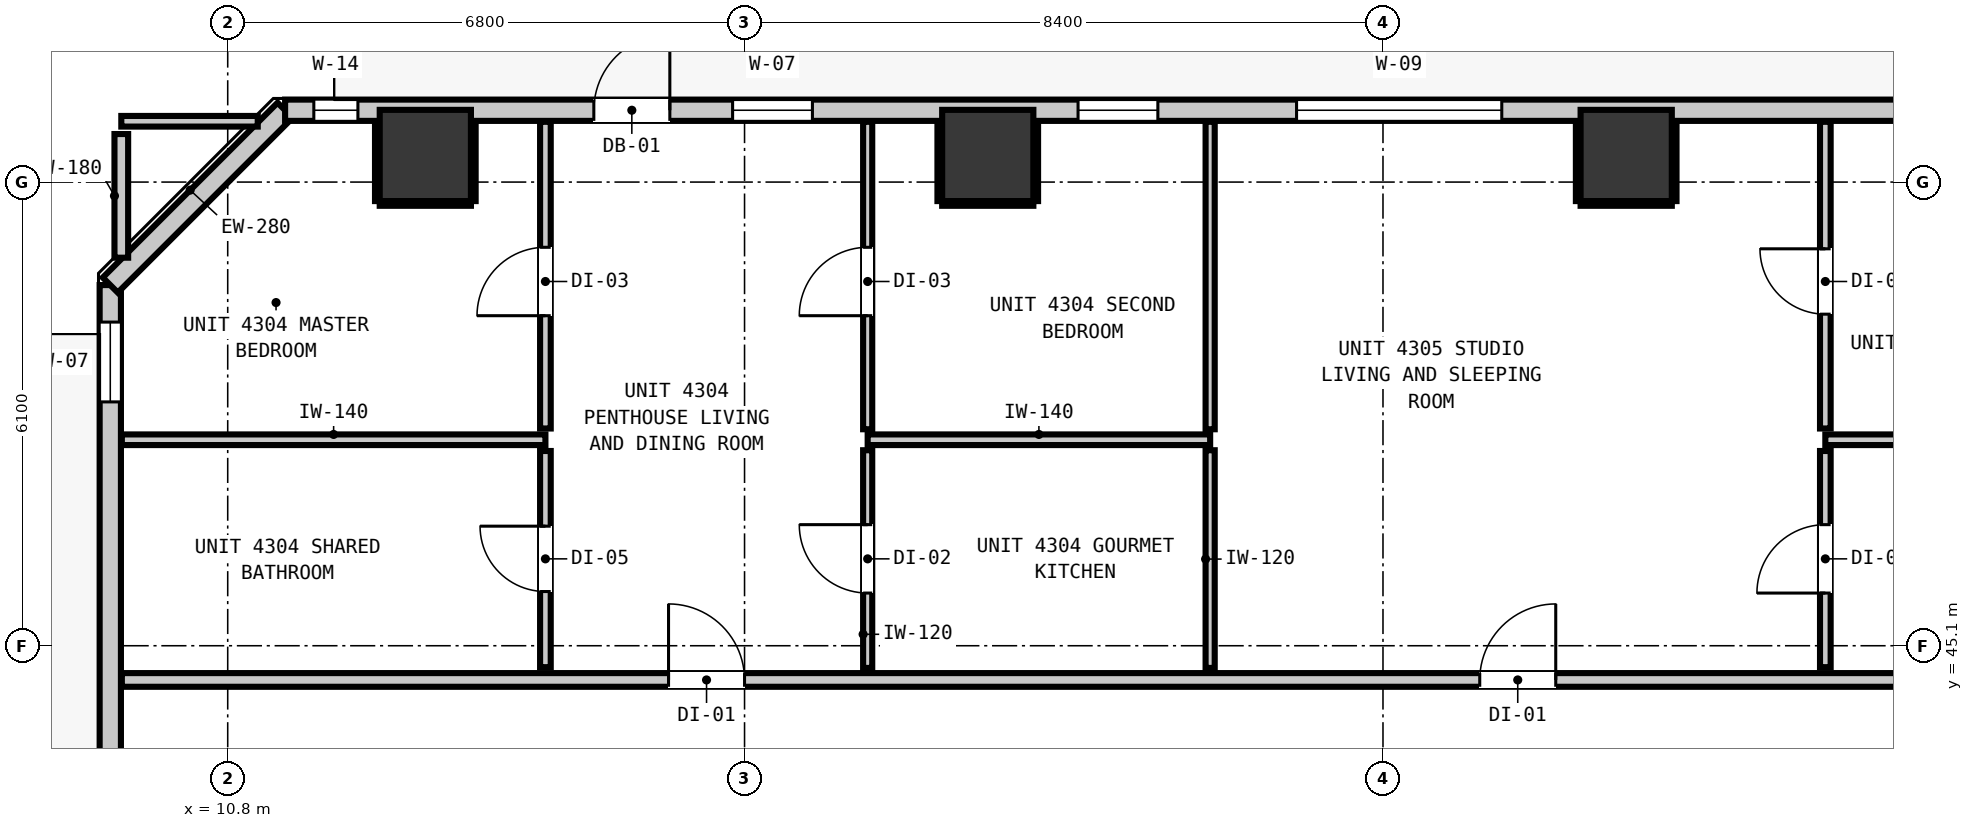
"""IFC4 building model, lengths in metres.
Left out: names, types, materials, properties, quantities, classifications, styles, units other than length and angle.
Written with IfcOpenShell. Run it as: python <this file> out.ifc"""

import sys

from ifc_helpers import new_model, si_unit, direction, frame, frame_2d, origin, origin_2d, place, context, subcontext, project, spatial, rectangle, extrude, element, fill, save


model = new_model("IFC4")
c1 = context("Model", 3, precision=1e-05, world=origin(), true_north=direction((0.0, 1.0)))
c2 = subcontext(c1, "Body", "Model", "MODEL_VIEW")
j1 = project(units=[si_unit("LENGTHUNIT", "METRE"), si_unit("PLANEANGLEUNIT", "RADIAN")], contexts=[c1])
p1 = place(None, origin())
s1 = spatial("IfcSite", under=j1, at=p1, CompositionType="ELEMENT")
p2 = place(p1, origin())
s2 = spatial("IfcBuilding", under=s1, at=p2, CompositionType="ELEMENT")
p3 = place(p2, frame((0.0, 0.0, 149.24)))
s3 = spatial("IfcBuildingStorey", under=s2, at=p3, CompositionType="ELEMENT", Elevation=149.24)
for number, where, z_axis, x_axis in (
    (1, (13.4, 51.55, 0.0), (0.0, 0.0, 1.0), (1.0, 0.0, 0.0)),
    (2, (20.8, 51.55, 0.0), (0.0, 0.0, 1.0), (1.0, 0.0, 0.0)),
    (3, (29.2, 51.55, 0.0), (0.0, 0.0, 1.0), (1.0, 0.0, 0.0)),
):
    element("IfcColumn", number, at=place(p3, frame(where, z_axis=z_axis, x_axis=x_axis)), inside=s3, PredefinedType="COLUMN", context=c2, shape_type="SweptSolid", body=[
        extrude(rectangle(XDim=1.2, YDim=1.2, at=origin_2d()), origin(), (0.0, 0.0, 1.0), 3.32),
    ])
p4 = place(p3, frame((9.255, 17.555, 0.0), z_axis=(0.0, 0.0, 1.0), x_axis=(0.0, 1.0, 0.0)))
e4 = element("IfcWall", 4, at=p4, inside=s3, PredefinedType="STANDARD", context=c2, shape_type="SweptSolid", body=[
    extrude(rectangle(XDim=32.29, YDim=0.28, at=frame_2d((16.145, 0.0))), origin(), (0.0, 0.0, 1.0), 3.08),
])
p5 = place(p4, frame((5.467, 0.0, 0.0)))
e5 = element("IfcOpeningElement", 5, at=p5, cuts=e4, PredefinedType="OPENING", context=c2, shape_type="SweptSolid", body=[
    extrude(rectangle(XDim=1.0, YDim=2.15, at=frame_2d((0.5, 1.075))), frame((0.0, 0.15, 0.0), z_axis=(0.0, -1.0, 0.0), x_axis=(1.0, 0.0, 0.0)), (0.0, 0.0, 1.0), 0.3),
])
p6 = place(p4, frame((30.753, 0.0, 0.85)))
e6 = element("IfcOpeningElement", 6, at=p6, cuts=e4, PredefinedType="OPENING", context=c2, shape_type="SweptSolid", body=[
    extrude(rectangle(XDim=1.05, YDim=1.65, at=frame_2d((0.525, 0.825))), frame((0.0, 0.15, 0.0), z_axis=(0.0, -1.0, 0.0), x_axis=(1.0, 0.0, 0.0)), (0.0, 0.0, 1.0), 0.3),
])
p7 = place(p3, frame((9.255, 49.845, 0.0), z_axis=(0.0, 0.0, 1.0), x_axis=(0.707106781187, 0.707106781187, 0.0)))
e7 = element("IfcWall", 7, at=p7, inside=s3, PredefinedType="STANDARD", context=c2, shape_type="SweptSolid", body=[
    extrude(rectangle(XDim=3.253, YDim=0.28, at=frame_2d((1.626, 0.0))), origin(), (0.0, 0.0, 1.0), 3.08),
])
p8 = place(p3, frame((11.555, 52.145, 0.0), z_axis=(0.0, 0.0, 1.0), x_axis=(1.0, 0.0, 0.0)))
e8 = element("IfcWall", 8, at=p8, inside=s3, PredefinedType="STANDARD", context=c2, shape_type="SweptSolid", body=[
    extrude(rectangle(XDim=35.09, YDim=0.28, at=frame_2d((17.545, 0.0))), origin(), (0.0, 0.0, 1.0), 3.08),
])
p9 = place(p8, frame((4.062, 0.0, 0.0)))
e9 = element("IfcOpeningElement", 9, at=p9, cuts=e8, PredefinedType="OPENING", context=c2, shape_type="SweptSolid", body=[
    extrude(rectangle(XDim=1.0, YDim=2.15, at=frame_2d((0.5, 1.075))), frame((0.0, 0.15, 0.0), z_axis=(0.0, -1.0, 0.0), x_axis=(1.0, 0.0, 0.0)), (0.0, 0.0, 1.0), 0.3),
])
p10 = place(p8, frame((5.888, 0.0, 0.85)))
e10 = element("IfcOpeningElement", 10, at=p10, cuts=e8, PredefinedType="OPENING", context=c2, shape_type="SweptSolid", body=[
    extrude(rectangle(XDim=1.05, YDim=1.65, at=frame_2d((0.525, 0.825))), frame((0.0, 0.15, 0.0), z_axis=(0.0, -1.0, 0.0), x_axis=(1.0, 0.0, 0.0)), (0.0, 0.0, 1.0), 0.3),
])
p11 = place(p8, frame((0.378, 0.0, 0.85)))
e11 = element("IfcOpeningElement", 11, at=p11, cuts=e8, PredefinedType="OPENING", context=c2, shape_type="SweptSolid", body=[
    extrude(rectangle(XDim=0.58, YDim=1.5, at=frame_2d((0.29, 0.75))), frame((0.0, 0.15, 0.0), z_axis=(0.0, -1.0, 0.0), x_axis=(1.0, 0.0, 0.0)), (0.0, 0.0, 1.0), 0.3),
])
p12 = place(p8, frame((10.433, 0.0, 0.85)))
e12 = element("IfcOpeningElement", 12, at=p12, cuts=e8, PredefinedType="OPENING", context=c2, shape_type="SweptSolid", body=[
    extrude(rectangle(XDim=1.05, YDim=1.65, at=frame_2d((0.525, 0.825))), frame((0.0, 0.15, 0.0), z_axis=(0.0, -1.0, 0.0), x_axis=(1.0, 0.0, 0.0)), (0.0, 0.0, 1.0), 0.3),
])
p13 = place(p8, frame((13.308, 0.0, 0.85)))
e13 = element("IfcOpeningElement", 13, at=p13, cuts=e8, PredefinedType="OPENING", context=c2, shape_type="SweptSolid", body=[
    extrude(rectangle(XDim=2.7, YDim=2.0, at=frame_2d((1.35, 1.0))), frame((0.0, 0.15, 0.0), z_axis=(0.0, -1.0, 0.0), x_axis=(1.0, 0.0, 0.0)), (0.0, 0.0, 1.0), 0.3),
])
p14 = place(p8, frame((28.922, 0.0, 0.85)))
e14 = element("IfcOpeningElement", 14, at=p14, cuts=e8, PredefinedType="OPENING", context=c2, shape_type="SweptSolid", body=[
    extrude(rectangle(XDim=2.7, YDim=2.0, at=frame_2d((1.35, 1.0))), frame((0.0, 0.15, 0.0), z_axis=(0.0, -1.0, 0.0), x_axis=(1.0, 0.0, 0.0)), (0.0, 0.0, 1.0), 0.3),
])
p15 = place(p3, frame((9.407, 44.65, 0.0), z_axis=(0.0, 0.0, 1.0), x_axis=(1.0, 0.0, 0.0)))
e15 = element("IfcWall", 15, at=p15, inside=s3, PredefinedType="PARTITIONING", context=c2, shape_type="SweptSolid", body=[
    extrude(rectangle(XDim=39.386, YDim=0.18, at=frame_2d((19.693, 0.0))), origin(), (0.0, 0.0, 1.0), 3.08),
])
p16 = place(p15, frame((7.193, 0.0, 0.0)))
e16 = element("IfcOpeningElement", 16, at=p16, cuts=e15, PredefinedType="OPENING", context=c2, shape_type="SweptSolid", body=[
    extrude(rectangle(XDim=1.0, YDim=2.15, at=frame_2d((0.5, 1.075))), frame((0.0, 0.1, 0.0), z_axis=(0.0, -1.0, 0.0), x_axis=(1.0, 0.0, 0.0)), (0.0, 0.0, 1.0), 0.2),
])
p17 = place(p15, frame((17.866, 0.0, 0.0)))
e17 = element("IfcOpeningElement", 17, at=p17, cuts=e15, PredefinedType="OPENING", context=c2, shape_type="SweptSolid", body=[
    extrude(rectangle(XDim=1.0, YDim=2.15, at=frame_2d((0.5, 1.075))), frame((0.0, 0.1, 0.0), z_axis=(0.0, -1.0, 0.0), x_axis=(1.0, 0.0, 0.0)), (0.0, 0.0, 1.0), 0.2),
])
p18 = place(p15, frame((31.929, 0.0, 0.0)))
e18 = element("IfcOpeningElement", 18, at=p18, cuts=e15, PredefinedType="OPENING", context=c2, shape_type="SweptSolid", body=[
    extrude(rectangle(XDim=0.9, YDim=2.1, at=frame_2d((0.45, 1.05))), frame((0.0, 0.1, 0.0), z_axis=(0.0, -1.0, 0.0), x_axis=(1.0, 0.0, 0.0)), (0.0, 0.0, 1.0), 0.2),
])
p19 = place(p3, frame((9.407, 47.81, 0.0), z_axis=(0.0, 0.0, 1.0), x_axis=(1.0, 0.0, 0.0)))
e19 = element("IfcWall", 19, at=p19, inside=s3, PredefinedType="PARTITIONING", context=c2, shape_type="SweptSolid", body=[
    extrude(rectangle(XDim=5.573, YDim=0.14, at=frame_2d((2.787, 0.0))), origin(), (0.0, 0.0, 1.0), 3.08),
])
p20 = place(p3, frame((19.22, 47.81, 0.0), z_axis=(0.0, 0.0, 1.0), x_axis=(1.0, 0.0, 0.0)))
e20 = element("IfcWall", 20, at=p20, inside=s3, PredefinedType="PARTITIONING", context=c2, shape_type="SweptSolid", body=[
    extrude(rectangle(XDim=4.506, YDim=0.14, at=frame_2d((2.253, 0.0))), origin(), (0.0, 0.0, 1.0), 3.08),
])
p21 = place(p3, frame((31.82, 47.81, 0.0), z_axis=(0.0, 0.0, 1.0), x_axis=(1.0, 0.0, 0.0)))
e21 = element("IfcWall", 21, at=p21, inside=s3, PredefinedType="PARTITIONING", context=c2, shape_type="SweptSolid", body=[
    extrude(rectangle(XDim=3.0, YDim=0.14, at=frame_2d((1.5, 0.0))), origin(), (0.0, 0.0, 1.0), 3.08),
])
p22 = place(p3, frame((9.4, 52.0, 0.0), z_axis=(0.0, 0.0, 1.0), x_axis=(1.0, 0.0, 0.0)))
e22 = element("IfcWall", 22, at=p22, inside=s3, PredefinedType="PARTITIONING", context=c2, shape_type="SweptSolid", body=[
    extrude(rectangle(XDim=1.795, YDim=0.14, at=frame_2d((0.897, 0.0))), origin(), (0.0, 0.0, 1.0), 3.08),
])
p23 = place(p3, frame((9.4, 50.205, 0.0), z_axis=(0.0, 0.0, 1.0), x_axis=(0.0, 1.0, 0.0)))
e23 = element("IfcWall", 23, at=p23, inside=s3, PredefinedType="PARTITIONING", context=c2, shape_type="SweptSolid", body=[
    extrude(rectangle(XDim=1.627, YDim=0.18, at=frame_2d((0.813, 0.0))), origin(), (0.0, 0.0, 1.0), 3.08),
])
p24 = place(p3, frame((14.98, 44.818, 0.0), z_axis=(0.0, 0.0, 1.0), x_axis=(0.0, 1.0, 0.0)))
e24 = element("IfcWall", 24, at=p24, inside=s3, PredefinedType="PARTITIONING", context=c2, shape_type="SweptSolid", body=[
    extrude(rectangle(XDim=2.844, YDim=0.14, at=frame_2d((1.422, 0.0))), origin(), (0.0, 0.0, 1.0), 3.08),
])
p25 = place(p24, frame((0.995, 0.0, 0.0)))
e25 = element("IfcOpeningElement", 25, at=p25, cuts=e24, PredefinedType="OPENING", context=c2, shape_type="SweptSolid", body=[
    extrude(rectangle(XDim=0.86, YDim=2.02, at=frame_2d((0.43, 1.01))), frame((0.0, 0.08, 0.0), z_axis=(0.0, -1.0, 0.0), x_axis=(1.0, 0.0, 0.0)), (0.0, 0.0, 1.0), 0.16),
])
p26 = place(p3, frame((14.98, 47.958, 0.0), z_axis=(0.0, 0.0, 1.0), x_axis=(0.0, 1.0, 0.0)))
e26 = element("IfcWall", 26, at=p26, inside=s3, PredefinedType="PARTITIONING", context=c2, shape_type="SweptSolid", body=[
    extrude(rectangle(XDim=4.035, YDim=0.14, at=frame_2d((2.018, 0.0))), origin(), (0.0, 0.0, 1.0), 3.08),
])
p27 = place(p26, frame((1.484, 0.0, 0.0)))
e27 = element("IfcOpeningElement", 27, at=p27, cuts=e26, PredefinedType="OPENING", context=c2, shape_type="SweptSolid", body=[
    extrude(rectangle(XDim=0.9, YDim=2.1, at=frame_2d((0.45, 1.05))), frame((0.0, 0.08, 0.0), z_axis=(0.0, -1.0, 0.0), x_axis=(1.0, 0.0, 0.0)), (0.0, 0.0, 1.0), 0.16),
])
p28 = place(p3, frame((31.82, 44.818, 0.0), z_axis=(0.0, 0.0, 1.0), x_axis=(0.0, 1.0, 0.0)))
e28 = element("IfcWall", 28, at=p28, inside=s3, PredefinedType="PARTITIONING", context=c2, shape_type="SweptSolid", body=[
    extrude(rectangle(XDim=2.844, YDim=0.14, at=frame_2d((1.422, 0.0))), origin(), (0.0, 0.0, 1.0), 3.08),
])
p29 = place(p28, frame((0.975, 0.0, 0.0)))
e29 = element("IfcOpeningElement", 29, at=p29, cuts=e28, PredefinedType="OPENING", context=c2, shape_type="SweptSolid", body=[
    extrude(rectangle(XDim=0.9, YDim=2.1, at=frame_2d((0.45, 1.05))), frame((0.0, 0.08, 0.0), z_axis=(0.0, -1.0, 0.0), x_axis=(1.0, 0.0, 0.0)), (0.0, 0.0, 1.0), 0.16),
])
p30 = place(p3, frame((31.82, 47.958, 0.0), z_axis=(0.0, 0.0, 1.0), x_axis=(0.0, 1.0, 0.0)))
e30 = element("IfcWall", 30, at=p30, inside=s3, PredefinedType="PARTITIONING", context=c2, shape_type="SweptSolid", body=[
    extrude(rectangle(XDim=4.035, YDim=0.14, at=frame_2d((2.018, 0.0))), origin(), (0.0, 0.0, 1.0), 3.08),
])
p31 = place(p30, frame((1.504, 0.0, 0.0)))
e31 = element("IfcOpeningElement", 31, at=p31, cuts=e30, PredefinedType="OPENING", context=c2, shape_type="SweptSolid", body=[
    extrude(rectangle(XDim=0.86, YDim=2.02, at=frame_2d((0.43, 1.01))), frame((0.0, 0.08, 0.0), z_axis=(0.0, -1.0, 0.0), x_axis=(1.0, 0.0, 0.0)), (0.0, 0.0, 1.0), 0.16),
])
p32 = place(p3, frame((19.22, 44.808, 0.0), z_axis=(0.0, 0.0, 1.0), x_axis=(0.0, 1.0, 0.0)))
e32 = element("IfcWall", 32, at=p32, inside=s3, PredefinedType="PARTITIONING", context=c2, shape_type="SweptSolid", body=[
    extrude(rectangle(XDim=2.864, YDim=0.12, at=frame_2d((1.432, 0.0))), origin(), (0.0, 0.0, 1.0), 3.08),
])
p33 = place(p32, frame((0.985, 0.0, 0.0)))
e33 = element("IfcOpeningElement", 33, at=p33, cuts=e32, PredefinedType="OPENING", context=c2, shape_type="SweptSolid", body=[
    extrude(rectangle(XDim=0.9, YDim=2.1, at=frame_2d((0.45, 1.05))), frame((0.0, 0.07, 0.0), z_axis=(0.0, -1.0, 0.0), x_axis=(1.0, 0.0, 0.0)), (0.0, 0.0, 1.0), 0.14),
])
p34 = place(p3, frame((19.22, 47.948, 0.0), z_axis=(0.0, 0.0, 1.0), x_axis=(0.0, 1.0, 0.0)))
e34 = element("IfcWall", 34, at=p34, inside=s3, PredefinedType="PARTITIONING", context=c2, shape_type="SweptSolid", body=[
    extrude(rectangle(XDim=4.045, YDim=0.12, at=frame_2d((2.022, 0.0))), origin(), (0.0, 0.0, 1.0), 3.08),
])
p35 = place(p34, frame((1.494, 0.0, 0.0)))
e35 = element("IfcOpeningElement", 35, at=p35, cuts=e34, PredefinedType="OPENING", context=c2, shape_type="SweptSolid", body=[
    extrude(rectangle(XDim=0.9, YDim=2.1, at=frame_2d((0.45, 1.05))), frame((0.0, 0.07, 0.0), z_axis=(0.0, -1.0, 0.0), x_axis=(1.0, 0.0, 0.0)), (0.0, 0.0, 1.0), 0.14),
])
p36 = place(p3, frame((23.726, 44.808, 0.0), z_axis=(0.0, 0.0, 1.0), x_axis=(0.0, 1.0, 0.0)))
e36 = element("IfcWall", 36, at=p36, inside=s3, PredefinedType="PARTITIONING", context=c2, shape_type="SweptSolid", body=[
    extrude(rectangle(XDim=2.864, YDim=0.12, at=frame_2d((1.432, 0.0))), origin(), (0.0, 0.0, 1.0), 3.08),
])
p37 = place(p3, frame((23.726, 47.948, 0.0), z_axis=(0.0, 0.0, 1.0), x_axis=(0.0, 1.0, 0.0)))
e37 = element("IfcWall", 37, at=p37, inside=s3, PredefinedType="PARTITIONING", context=c2, shape_type="SweptSolid", body=[
    extrude(rectangle(XDim=4.045, YDim=0.12, at=frame_2d((2.022, 0.0))), origin(), (0.0, 0.0, 1.0), 3.08),
])
p38 = place(p3, frame((12.8, 50.918, 0.0), z_axis=(0.0, 0.0, 1.0), x_axis=(1.0, 0.0, 0.0)))
e38 = element("IfcWall", 38, at=p38, inside=s3, PredefinedType="PARTITIONING", context=c2, shape_type="SweptSolid", body=[
    extrude(rectangle(XDim=1.2, YDim=0.06, at=frame_2d((0.6, 0.0))), origin(), (0.0, 0.0, 1.0), 1.45),
])
for number, where, z_axis, x_axis in (
    (39, (12.768, 50.95, 0.0), (0.0, 0.0, 1.0), (0.0, 1.0, 0.0)),
    (40, (14.032, 50.95, 0.0), (0.0, 0.0, 1.0), (0.0, 1.0, 0.0)),
):
    element("IfcWall", number, at=place(p3, frame(where, z_axis=z_axis, x_axis=x_axis)), inside=s3, PredefinedType="PARTITIONING", context=c2, shape_type="SweptSolid", body=[
        extrude(rectangle(XDim=1.04, YDim=0.06, at=frame_2d((0.52, 0.0))), origin(), (0.0, 0.0, 1.0), 1.45),
    ])
p39 = place(p3, frame((20.2, 50.918, 0.0), z_axis=(0.0, 0.0, 1.0), x_axis=(1.0, 0.0, 0.0)))
e41 = element("IfcWall", 41, at=p39, inside=s3, PredefinedType="PARTITIONING", context=c2, shape_type="SweptSolid", body=[
    extrude(rectangle(XDim=1.2, YDim=0.06, at=frame_2d((0.6, 0.0))), origin(), (0.0, 0.0, 1.0), 1.45),
])
for number, where, z_axis, x_axis in (
    (42, (20.168, 50.95, 0.0), (0.0, 0.0, 1.0), (0.0, 1.0, 0.0)),
    (43, (21.432, 50.95, 0.0), (0.0, 0.0, 1.0), (0.0, 1.0, 0.0)),
):
    element("IfcWall", number, at=place(p3, frame(where, z_axis=z_axis, x_axis=x_axis)), inside=s3, PredefinedType="PARTITIONING", context=c2, shape_type="SweptSolid", body=[
        extrude(rectangle(XDim=1.04, YDim=0.06, at=frame_2d((0.52, 0.0))), origin(), (0.0, 0.0, 1.0), 1.45),
    ])
p40 = place(p3, frame((28.6, 50.918, 0.0), z_axis=(0.0, 0.0, 1.0), x_axis=(1.0, 0.0, 0.0)))
e44 = element("IfcWall", 44, at=p40, inside=s3, PredefinedType="PARTITIONING", context=c2, shape_type="SweptSolid", body=[
    extrude(rectangle(XDim=1.2, YDim=0.06, at=frame_2d((0.6, 0.0))), origin(), (0.0, 0.0, 1.0), 1.45),
])
for number, where, z_axis, x_axis in (
    (45, (28.568, 50.95, 0.0), (0.0, 0.0, 1.0), (0.0, 1.0, 0.0)),
    (46, (29.832, 50.95, 0.0), (0.0, 0.0, 1.0), (0.0, 1.0, 0.0)),
):
    element("IfcWall", number, at=place(p3, frame(where, z_axis=z_axis, x_axis=x_axis)), inside=s3, PredefinedType="PARTITIONING", context=c2, shape_type="SweptSolid", body=[
        extrude(rectangle(XDim=1.04, YDim=0.06, at=frame_2d((0.52, 0.0))), origin(), (0.0, 0.0, 1.0), 1.45),
    ])
p41 = place(p9, origin())
e47 = element("IfcDoor", 47, at=p41, inside=s3, OperationType="SINGLE_SWING_RIGHT", PredefinedType="DOOR", context=c2, shape_type="SweptSolid", body=[
    extrude(rectangle(XDim=1.0, YDim=2.15, at=frame_2d((0.5, 1.075))), frame((0.0, 0.025, 0.0), z_axis=(0.0, -1.0, 0.0), x_axis=(1.0, 0.0, 0.0)), (0.0, 0.0, 1.0), 0.05),
])
fill(e9, e47)
p42 = place(p6, origin())
e48 = element("IfcWindow", 48, at=p42, inside=s3, PartitioningType="SINGLE_PANEL", PredefinedType="WINDOW", context=c2, shape_type="SweptSolid", body=[
    extrude(rectangle(XDim=1.05, YDim=1.65, at=frame_2d((0.525, 0.825))), frame((0.0, 0.03, 0.0), z_axis=(0.0, -1.0, 0.0), x_axis=(1.0, 0.0, 0.0)), (0.0, 0.0, 1.0), 0.06),
])
fill(e6, e48)
p43 = place(p10, origin())
e49 = element("IfcWindow", 49, at=p43, inside=s3, PartitioningType="SINGLE_PANEL", PredefinedType="WINDOW", context=c2, shape_type="SweptSolid", body=[
    extrude(rectangle(XDim=1.05, YDim=1.65, at=frame_2d((0.525, 0.825))), frame((0.0, 0.03, 0.0), z_axis=(0.0, -1.0, 0.0), x_axis=(1.0, 0.0, 0.0)), (0.0, 0.0, 1.0), 0.06),
])
fill(e10, e49)
p44 = place(p11, origin())
e50 = element("IfcWindow", 50, at=p44, inside=s3, PartitioningType="SINGLE_PANEL", PredefinedType="WINDOW", context=c2, shape_type="SweptSolid", body=[
    extrude(rectangle(XDim=0.58, YDim=1.5, at=frame_2d((0.29, 0.75))), frame((0.0, 0.03, 0.0), z_axis=(0.0, -1.0, 0.0), x_axis=(1.0, 0.0, 0.0)), (0.0, 0.0, 1.0), 0.06),
])
fill(e11, e50)
p45 = place(p12, origin())
e51 = element("IfcWindow", 51, at=p45, inside=s3, PartitioningType="SINGLE_PANEL", PredefinedType="WINDOW", context=c2, shape_type="SweptSolid", body=[
    extrude(rectangle(XDim=1.05, YDim=1.65, at=frame_2d((0.525, 0.825))), frame((0.0, 0.03, 0.0), z_axis=(0.0, -1.0, 0.0), x_axis=(1.0, 0.0, 0.0)), (0.0, 0.0, 1.0), 0.06),
])
fill(e12, e51)
p46 = place(p13, origin())
e52 = element("IfcWindow", 52, at=p46, inside=s3, PartitioningType="SINGLE_PANEL", PredefinedType="WINDOW", context=c2, shape_type="SweptSolid", body=[
    extrude(rectangle(XDim=2.7, YDim=2.0, at=frame_2d((1.35, 1.0))), frame((0.0, 0.03, 0.0), z_axis=(0.0, -1.0, 0.0), x_axis=(1.0, 0.0, 0.0)), (0.0, 0.0, 1.0), 0.06),
])
fill(e13, e52)
p47 = place(p16, origin())
e53 = element("IfcDoor", 53, at=p47, inside=s3, OperationType="SINGLE_SWING_LEFT", PredefinedType="DOOR", context=c2, shape_type="SweptSolid", body=[
    extrude(rectangle(XDim=1.0, YDim=2.15, at=frame_2d((0.5, 1.075))), frame((0.0, 0.025, 0.0), z_axis=(0.0, -1.0, 0.0), x_axis=(1.0, 0.0, 0.0)), (0.0, 0.0, 1.0), 0.05),
])
fill(e16, e53)
p48 = place(p25, origin())
e54 = element("IfcDoor", 54, at=p48, inside=s3, OperationType="SINGLE_SWING_RIGHT", PredefinedType="DOOR", context=c2, shape_type="SweptSolid", body=[
    extrude(rectangle(XDim=0.86, YDim=2.02, at=frame_2d((0.43, 1.01))), frame((0.0, 0.025, 0.0), z_axis=(0.0, -1.0, 0.0), x_axis=(1.0, 0.0, 0.0)), (0.0, 0.0, 1.0), 0.05),
])
fill(e25, e54)
p49 = place(p27, origin())
e55 = element("IfcDoor", 55, at=p49, inside=s3, OperationType="SINGLE_SWING_LEFT", PredefinedType="DOOR", context=c2, shape_type="SweptSolid", body=[
    extrude(rectangle(XDim=0.9, YDim=2.1, at=frame_2d((0.45, 1.05))), frame((0.0, 0.025, 0.0), z_axis=(0.0, -1.0, 0.0), x_axis=(1.0, 0.0, 0.0)), (0.0, 0.0, 1.0), 0.05),
])
fill(e27, e55)
p50 = place(p33, origin())
e56 = element("IfcDoor", 56, at=p50, inside=s3, OperationType="SINGLE_SWING_RIGHT", PredefinedType="DOOR", context=c2, shape_type="SweptSolid", body=[
    extrude(rectangle(XDim=0.9, YDim=2.1, at=frame_2d((0.45, 1.05))), frame((0.0, 0.025, 0.0), z_axis=(0.0, -1.0, 0.0), x_axis=(1.0, 0.0, 0.0)), (0.0, 0.0, 1.0), 0.05),
])
fill(e33, e56)
p51 = place(p35, origin())
e57 = element("IfcDoor", 57, at=p51, inside=s3, OperationType="SINGLE_SWING_LEFT", PredefinedType="DOOR", context=c2, shape_type="SweptSolid", body=[
    extrude(rectangle(XDim=0.9, YDim=2.1, at=frame_2d((0.45, 1.05))), frame((0.0, 0.025, 0.0), z_axis=(0.0, -1.0, 0.0), x_axis=(1.0, 0.0, 0.0)), (0.0, 0.0, 1.0), 0.05),
])
fill(e35, e57)
p52 = place(p17, origin())
e58 = element("IfcDoor", 58, at=p52, inside=s3, OperationType="SINGLE_SWING_RIGHT", PredefinedType="DOOR", context=c2, shape_type="SweptSolid", body=[
    extrude(rectangle(XDim=1.0, YDim=2.15, at=frame_2d((0.5, 1.075))), frame((0.0, 0.025, 0.0), z_axis=(0.0, -1.0, 0.0), x_axis=(1.0, 0.0, 0.0)), (0.0, 0.0, 1.0), 0.05),
])
fill(e17, e58)
p53 = place(p29, origin())
e59 = element("IfcDoor", 59, at=p53, inside=s3, OperationType="SINGLE_SWING_LEFT", PredefinedType="DOOR", context=c2, shape_type="SweptSolid", body=[
    extrude(rectangle(XDim=0.9, YDim=2.1, at=frame_2d((0.45, 1.05))), frame((0.0, 0.025, 0.0), z_axis=(0.0, -1.0, 0.0), x_axis=(1.0, 0.0, 0.0)), (0.0, 0.0, 1.0), 0.05),
])
fill(e29, e59)
p54 = place(p31, origin())
e60 = element("IfcDoor", 60, at=p54, inside=s3, OperationType="SINGLE_SWING_RIGHT", PredefinedType="DOOR", context=c2, shape_type="SweptSolid", body=[
    extrude(rectangle(XDim=0.86, YDim=2.02, at=frame_2d((0.43, 1.01))), frame((0.0, 0.025, 0.0), z_axis=(0.0, -1.0, 0.0), x_axis=(1.0, 0.0, 0.0)), (0.0, 0.0, 1.0), 0.05),
])
fill(e31, e60)
save(model, sys.argv[1])
